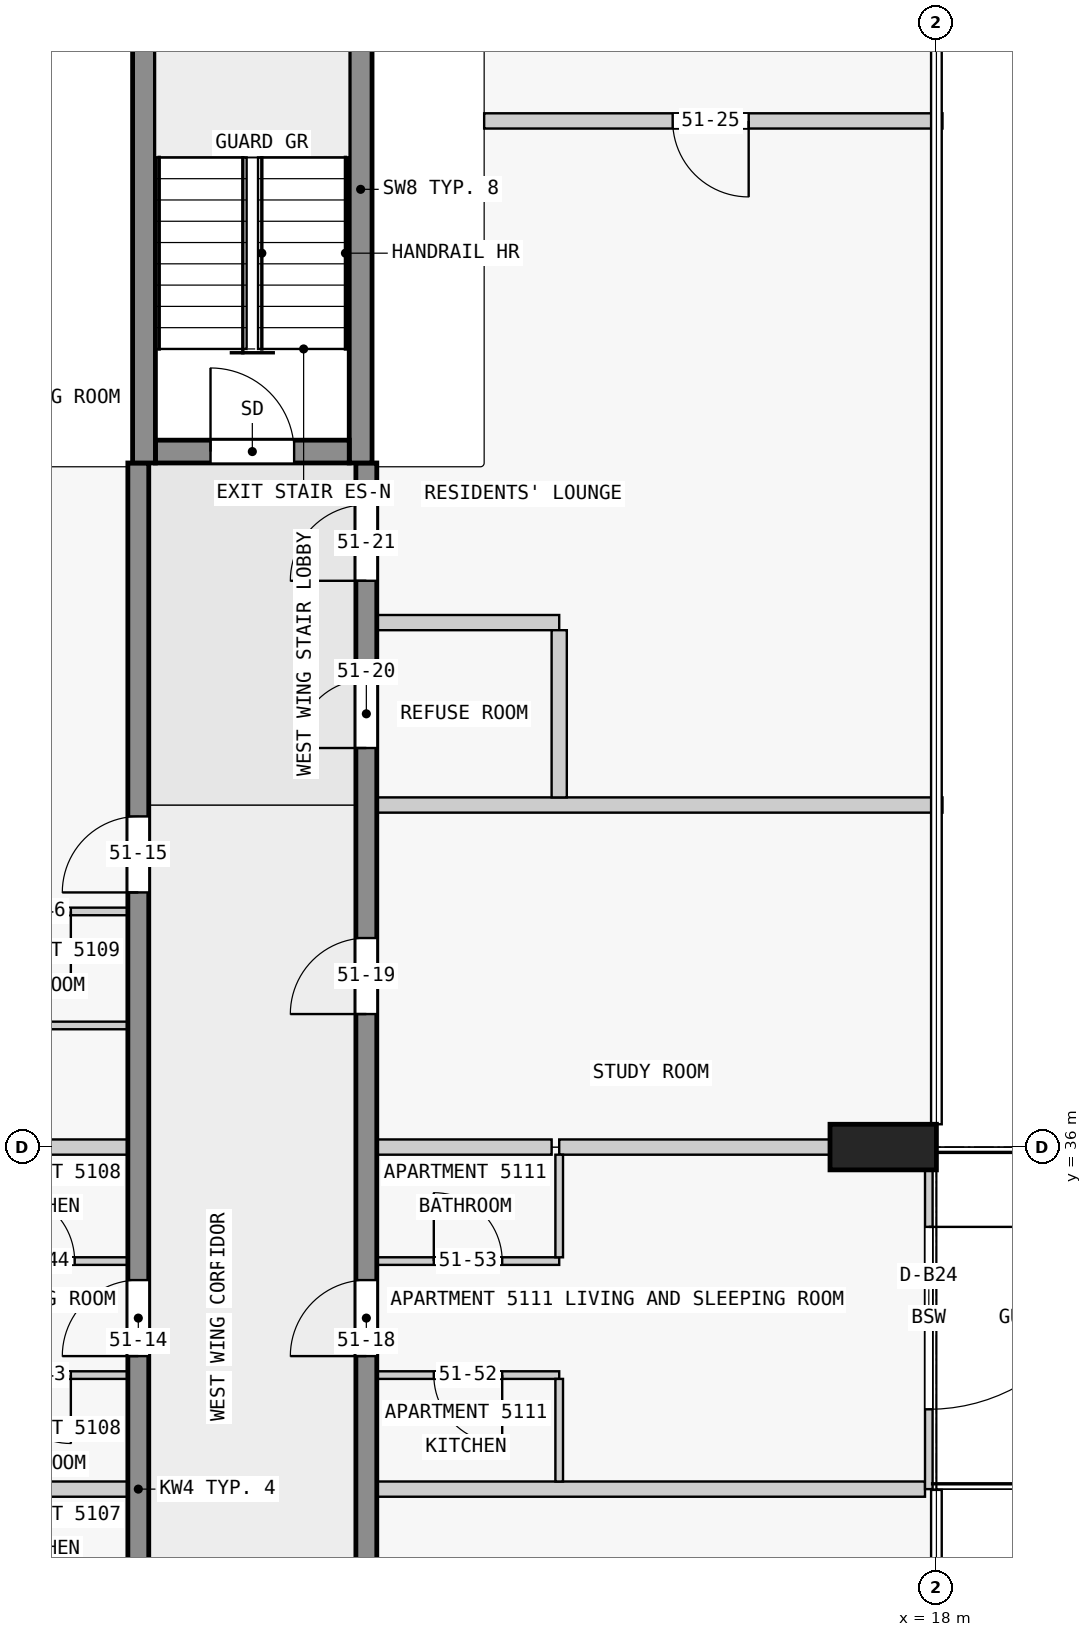
"""IFC4 building model, lengths in metres.
Left out: names, types, materials, properties, quantities, classifications, styles, units other than length and angle.
Written with IfcOpenShell. Run it as: python <this file> out.ifc"""

import sys

from ifc_helpers import new_model, si_unit, direction, frame, frame_2d, origin, origin_2d, place, context, subcontext, project, spatial, rectangle, extrude, element, fill, save


model = new_model("IFC4")
c1 = context("Model", 3, precision=1e-05, world=origin(), true_north=direction((0.0, 1.0)))
c2 = subcontext(c1, "Body", "Model", "MODEL_VIEW")
j1 = project(units=[si_unit("LENGTHUNIT", "METRE"), si_unit("PLANEANGLEUNIT", "RADIAN")], contexts=[c1])
p1 = place(None, origin())
s1 = spatial("IfcSite", under=j1, at=p1, CompositionType="ELEMENT")
p2 = place(p1, origin())
s2 = spatial("IfcBuilding", under=s1, at=p2, CompositionType="ELEMENT")
p3 = place(p2, frame((0.0, 0.0, 197.9)))
s3 = spatial("IfcBuildingStorey", under=s2, at=p3, CompositionType="ELEMENT", Elevation=197.9)
p4 = place(p3, frame((17.3, 36.0, 0.0), z_axis=(0.0, 0.0, 1.0), x_axis=(0.0, 1.0, 0.0)))
e1 = element("IfcColumn", 1, at=p4, inside=s3, PredefinedType="COLUMN", context=c2, shape_type="SweptSolid", body=[
    extrude(rectangle(XDim=0.6, YDim=1.4, at=origin_2d()), origin(), (0.0, 0.0, 1.0), 3.5),
])
p5 = place(p3, frame((7.725, 45.15, 0.0), z_axis=(0.0, 0.0, 1.0), x_axis=(1.0, 0.0, 0.0)))
e2 = element("IfcWall", 2, at=p5, inside=s3, PredefinedType="SHEAR", context=c2, shape_type="SweptSolid", body=[
    extrude(rectangle(XDim=2.55, YDim=0.3, at=frame_2d((1.275, 0.0))), origin(), (0.0, 0.0, 1.0), 3.5),
])
p6 = place(p5, frame((0.725, 0.0, 0.0)))
e3 = element("IfcOpeningElement", 3, at=p6, cuts=e2, PredefinedType="OPENING", context=c2, shape_type="SweptSolid", body=[
    extrude(rectangle(XDim=1.1, YDim=2.1, at=frame_2d((0.55, 1.05))), frame((0.0, 0.16, 0.0), z_axis=(0.0, -1.0, 0.0), x_axis=(1.0, 0.0, 0.0)), (0.0, 0.0, 1.0), 0.32),
])
for number, where, z_axis, x_axis in (
    (4, (7.575, 45.0, 0.0), (0.0, 0.0, 1.0), (0.0, 1.0, 0.0)),
    (5, (10.425, 45.0, 0.0), (0.0, 0.0, 1.0), (0.0, 1.0, 0.0)),
):
    element("IfcWall", number, at=place(p3, frame(where, z_axis=z_axis, x_axis=x_axis)), inside=s3, PredefinedType="SHEAR", context=c2, shape_type="SweptSolid", body=[
        extrude(rectangle(XDim=7.2, YDim=0.3, at=frame_2d((3.6, 0.0))), origin(), (0.0, 0.0, 1.0), 3.5),
    ])
p7 = place(p3, frame((7.5, 18.0, 0.0), z_axis=(0.0, 0.0, 1.0), x_axis=(0.0, 1.0, 0.0)))
e6 = element("IfcWall", 6, at=p7, inside=s3, PredefinedType="SHEAR", context=c2, shape_type="SweptSolid", body=[
    extrude(rectangle(XDim=27.0, YDim=0.275, at=frame_2d((13.5, 0.0))), origin(), (0.0, 0.0, 1.0), 3.25),
])
p8 = place(p7, frame((1.75, 0.0, 0.0)))
e7 = element("IfcOpeningElement", 7, at=p8, cuts=e6, PredefinedType="OPENING", context=c2, shape_type="SweptSolid", body=[
    extrude(rectangle(XDim=1.0, YDim=2.1, at=frame_2d((0.5, 1.05))), frame((0.0, 0.147, 0.0), z_axis=(0.0, -1.0, 0.0), x_axis=(1.0, 0.0, 0.0)), (0.0, 0.0, 1.0), 0.295),
])
p9 = place(p7, frame((5.85, 0.0, 0.0)))
e8 = element("IfcOpeningElement", 8, at=p9, cuts=e6, PredefinedType="OPENING", context=c2, shape_type="SweptSolid", body=[
    extrude(rectangle(XDim=1.8, YDim=2.1, at=frame_2d((0.9, 1.05))), frame((0.0, 0.147, 0.0), z_axis=(0.0, -1.0, 0.0), x_axis=(1.0, 0.0, 0.0)), (0.0, 0.0, 1.0), 0.295),
])
p10 = place(p7, frame((10.75, 0.0, 0.0)))
e9 = element("IfcOpeningElement", 9, at=p10, cuts=e6, PredefinedType="OPENING", context=c2, shape_type="SweptSolid", body=[
    extrude(rectangle(XDim=1.0, YDim=2.1, at=frame_2d((0.5, 1.05))), frame((0.0, 0.147, 0.0), z_axis=(0.0, -1.0, 0.0), x_axis=(1.0, 0.0, 0.0)), (0.0, 0.0, 1.0), 0.295),
])
p11 = place(p7, frame((15.25, 0.0, 0.0)))
e10 = element("IfcOpeningElement", 10, at=p11, cuts=e6, PredefinedType="OPENING", context=c2, shape_type="SweptSolid", body=[
    extrude(rectangle(XDim=1.0, YDim=2.1, at=frame_2d((0.5, 1.05))), frame((0.0, 0.147, 0.0), z_axis=(0.0, -1.0, 0.0), x_axis=(1.0, 0.0, 0.0)), (0.0, 0.0, 1.0), 0.295),
])
p12 = place(p7, frame((21.35, 0.0, 0.0)))
e11 = element("IfcOpeningElement", 11, at=p12, cuts=e6, PredefinedType="OPENING", context=c2, shape_type="SweptSolid", body=[
    extrude(rectangle(XDim=1.0, YDim=2.1, at=frame_2d((0.5, 1.05))), frame((0.0, 0.147, 0.0), z_axis=(0.0, -1.0, 0.0), x_axis=(1.0, 0.0, 0.0)), (0.0, 0.0, 1.0), 0.295),
])
p13 = place(p3, frame((10.5, 18.0, 0.0), z_axis=(0.0, 0.0, 1.0), x_axis=(0.0, 1.0, 0.0)))
e12 = element("IfcWall", 12, at=p13, inside=s3, PredefinedType="SHEAR", context=c2, shape_type="SweptSolid", body=[
    extrude(rectangle(XDim=27.0, YDim=0.275, at=frame_2d((13.5, 0.0))), origin(), (0.0, 0.0, 1.0), 3.25),
])
p14 = place(p13, frame((1.75, 0.0, 0.0)))
e13 = element("IfcOpeningElement", 13, at=p14, cuts=e12, PredefinedType="OPENING", context=c2, shape_type="SweptSolid", body=[
    extrude(rectangle(XDim=1.0, YDim=2.1, at=frame_2d((0.5, 1.05))), frame((0.0, 0.147, 0.0), z_axis=(0.0, -1.0, 0.0), x_axis=(1.0, 0.0, 0.0)), (0.0, 0.0, 1.0), 0.295),
])
p15 = place(p13, frame((6.25, 0.0, 0.0)))
e14 = element("IfcOpeningElement", 14, at=p15, cuts=e12, PredefinedType="OPENING", context=c2, shape_type="SweptSolid", body=[
    extrude(rectangle(XDim=1.0, YDim=2.1, at=frame_2d((0.5, 1.05))), frame((0.0, 0.147, 0.0), z_axis=(0.0, -1.0, 0.0), x_axis=(1.0, 0.0, 0.0)), (0.0, 0.0, 1.0), 0.295),
])
p16 = place(p13, frame((15.25, 0.0, 0.0)))
e15 = element("IfcOpeningElement", 15, at=p16, cuts=e12, PredefinedType="OPENING", context=c2, shape_type="SweptSolid", body=[
    extrude(rectangle(XDim=1.0, YDim=2.1, at=frame_2d((0.5, 1.05))), frame((0.0, 0.147, 0.0), z_axis=(0.0, -1.0, 0.0), x_axis=(1.0, 0.0, 0.0)), (0.0, 0.0, 1.0), 0.295),
])
p17 = place(p13, frame((19.75, 0.0, 0.0)))
e16 = element("IfcOpeningElement", 16, at=p17, cuts=e12, PredefinedType="OPENING", context=c2, shape_type="SweptSolid", body=[
    extrude(rectangle(XDim=1.0, YDim=2.1, at=frame_2d((0.5, 1.05))), frame((0.0, 0.147, 0.0), z_axis=(0.0, -1.0, 0.0), x_axis=(1.0, 0.0, 0.0)), (0.0, 0.0, 1.0), 0.295),
])
p18 = place(p13, frame((23.25, 0.0, 0.0)))
e17 = element("IfcOpeningElement", 17, at=p18, cuts=e12, PredefinedType="OPENING", context=c2, shape_type="SweptSolid", body=[
    extrude(rectangle(XDim=0.9, YDim=2.1, at=frame_2d((0.45, 1.05))), frame((0.0, 0.147, 0.0), z_axis=(0.0, -1.0, 0.0), x_axis=(1.0, 0.0, 0.0)), (0.0, 0.0, 1.0), 0.295),
])
p19 = place(p13, frame((25.45, 0.0, 0.0)))
e18 = element("IfcOpeningElement", 18, at=p19, cuts=e12, PredefinedType="OPENING", context=c2, shape_type="SweptSolid", body=[
    extrude(rectangle(XDim=1.0, YDim=2.1, at=frame_2d((0.5, 1.05))), frame((0.0, 0.147, 0.0), z_axis=(0.0, -1.0, 0.0), x_axis=(1.0, 0.0, 0.0)), (0.0, 0.0, 1.0), 0.295),
])
p20 = place(p3, frame((17.9, 36.0, 0.0), z_axis=(0.0, 0.0, 1.0), x_axis=(0.0, -1.0, 0.0)))
e19 = element("IfcWall", 19, at=p20, inside=s3, PredefinedType="STANDARD", context=c2, shape_type="SweptSolid", body=[
    extrude(rectangle(XDim=4.5, YDim=0.1, at=frame_2d((2.25, 0.0))), origin(), (0.0, 0.0, 1.0), 3.25),
])
p21 = place(p20, frame((1.05, 0.0, 0.0)))
e20 = element("IfcOpeningElement", 20, at=p21, cuts=e19, PredefinedType="OPENING", context=c2, shape_type="SweptSolid", body=[
    extrude(rectangle(XDim=2.4, YDim=2.4, at=frame_2d((1.2, 1.2))), frame((0.0, 0.06, 0.0), z_axis=(0.0, -1.0, 0.0), x_axis=(1.0, 0.0, 0.0)), (0.0, 0.0, 1.0), 0.12),
])
p22 = place(p3, frame((7.363, 31.5, 0.0), z_axis=(0.0, 0.0, 1.0), x_axis=(-1.0, 0.0, 0.0)))
e21 = element("IfcWall", 21, at=p22, inside=s3, PredefinedType="PARTITIONING", context=c2, shape_type="SweptSolid", body=[
    extrude(rectangle(XDim=2.3, YDim=0.2, at=frame_2d((1.15, 0.0))), origin(), (0.0, 0.0, 1.0), 3.25),
])
p23 = place(p3, frame((17.85, 31.5, 0.0), z_axis=(0.0, 0.0, 1.0), x_axis=(-1.0, 0.0, 0.0)))
e22 = element("IfcWall", 22, at=p23, inside=s3, PredefinedType="PARTITIONING", context=c2, shape_type="SweptSolid", body=[
    extrude(rectangle(XDim=7.213, YDim=0.2, at=frame_2d((3.606, 0.0))), origin(), (0.0, 0.0, 1.0), 3.25),
])
p24 = place(p3, frame((7.363, 33.0, 0.0), z_axis=(0.0, 0.0, 1.0), x_axis=(-1.0, 0.0, 0.0)))
e23 = element("IfcWall", 23, at=p24, inside=s3, PredefinedType="PARTITIONING", context=c2, shape_type="SweptSolid", body=[
    extrude(rectangle(XDim=2.35, YDim=0.1, at=frame_2d((1.175, 0.0))), origin(), (0.0, 0.0, 1.0), 3.25),
])
p25 = place(p24, frame((0.75, 0.0, 0.0)))
e24 = element("IfcOpeningElement", 24, at=p25, cuts=e23, PredefinedType="OPENING", context=c2, shape_type="SweptSolid", body=[
    extrude(rectangle(XDim=0.9, YDim=2.1, at=frame_2d((0.45, 1.05))), frame((0.0, 0.06, 0.0), z_axis=(0.0, -1.0, 0.0), x_axis=(1.0, 0.0, 0.0)), (0.0, 0.0, 1.0), 0.12),
])
p26 = place(p3, frame((13.038, 33.0, 0.0), z_axis=(0.0, 0.0, 1.0), x_axis=(-1.0, 0.0, 0.0)))
e25 = element("IfcWall", 25, at=p26, inside=s3, PredefinedType="PARTITIONING", context=c2, shape_type="SweptSolid", body=[
    extrude(rectangle(XDim=2.4, YDim=0.1, at=frame_2d((1.2, 0.0))), origin(), (0.0, 0.0, 1.0), 3.25),
])
p27 = place(p26, frame((0.75, 0.0, 0.0)))
e26 = element("IfcOpeningElement", 26, at=p27, cuts=e25, PredefinedType="OPENING", context=c2, shape_type="SweptSolid", body=[
    extrude(rectangle(XDim=0.9, YDim=2.1, at=frame_2d((0.45, 1.05))), frame((0.0, 0.06, 0.0), z_axis=(0.0, -1.0, 0.0), x_axis=(1.0, 0.0, 0.0)), (0.0, 0.0, 1.0), 0.12),
])
p28 = place(p3, frame((5.012, 34.5, 0.0), z_axis=(0.0, 0.0, 1.0), x_axis=(1.0, 0.0, 0.0)))
e27 = element("IfcWall", 27, at=p28, inside=s3, PredefinedType="PARTITIONING", context=c2, shape_type="SweptSolid", body=[
    extrude(rectangle(XDim=2.35, YDim=0.1, at=frame_2d((1.175, 0.0))), origin(), (0.0, 0.0, 1.0), 3.25),
])
p29 = place(p28, frame((0.75, 0.0, 0.0)))
e28 = element("IfcOpeningElement", 28, at=p29, cuts=e27, PredefinedType="OPENING", context=c2, shape_type="SweptSolid", body=[
    extrude(rectangle(XDim=0.9, YDim=2.1, at=frame_2d((0.45, 1.05))), frame((0.0, 0.06, 0.0), z_axis=(0.0, -1.0, 0.0), x_axis=(1.0, 0.0, 0.0)), (0.0, 0.0, 1.0), 0.12),
])
p30 = place(p3, frame((10.637, 34.5, 0.0), z_axis=(0.0, 0.0, 1.0), x_axis=(1.0, 0.0, 0.0)))
e29 = element("IfcWall", 29, at=p30, inside=s3, PredefinedType="PARTITIONING", context=c2, shape_type="SweptSolid", body=[
    extrude(rectangle(XDim=2.4, YDim=0.1, at=frame_2d((1.2, 0.0))), origin(), (0.0, 0.0, 1.0), 3.25),
])
p31 = place(p30, frame((0.75, 0.0, 0.0)))
e30 = element("IfcOpeningElement", 30, at=p31, cuts=e29, PredefinedType="OPENING", context=c2, shape_type="SweptSolid", body=[
    extrude(rectangle(XDim=0.9, YDim=2.1, at=frame_2d((0.45, 1.05))), frame((0.0, 0.06, 0.0), z_axis=(0.0, -1.0, 0.0), x_axis=(1.0, 0.0, 0.0)), (0.0, 0.0, 1.0), 0.12),
])
for number, where, z_axis, x_axis in (
    (31, (7.363, 36.0, 0.0), (0.0, 0.0, 1.0), (-1.0, 0.0, 0.0)),
    (32, (12.938, 36.0, 0.0), (0.0, 0.0, 1.0), (-1.0, 0.0, 0.0)),
):
    element("IfcWall", number, at=place(p3, frame(where, z_axis=z_axis, x_axis=x_axis)), inside=s3, PredefinedType="PARTITIONING", context=c2, shape_type="SweptSolid", body=[
        extrude(rectangle(XDim=2.3, YDim=0.2, at=frame_2d((1.15, 0.0))), origin(), (0.0, 0.0, 1.0), 3.25),
    ])
p32 = place(p3, frame((13.038, 36.0, 0.0), z_axis=(0.0, 0.0, 1.0), x_axis=(1.0, 0.0, 0.0)))
e33 = element("IfcWall", 33, at=p32, inside=s3, PredefinedType="PARTITIONING", context=c2, shape_type="SweptSolid", body=[
    extrude(rectangle(XDim=3.562, YDim=0.2, at=frame_2d((1.781, 0.0))), origin(), (0.0, 0.0, 1.0), 3.25),
])
p33 = place(p3, frame((7.363, 37.6, 0.0), z_axis=(0.0, 0.0, 1.0), x_axis=(-1.0, 0.0, 0.0)))
e34 = element("IfcWall", 34, at=p33, inside=s3, PredefinedType="PARTITIONING", context=c2, shape_type="SweptSolid", body=[
    extrude(rectangle(XDim=2.35, YDim=0.1, at=frame_2d((1.175, 0.0))), origin(), (0.0, 0.0, 1.0), 3.25),
])
p34 = place(p3, frame((7.363, 39.1, 0.0), z_axis=(0.0, 0.0, 1.0), x_axis=(-1.0, 0.0, 0.0)))
e35 = element("IfcWall", 35, at=p34, inside=s3, PredefinedType="PARTITIONING", context=c2, shape_type="SweptSolid", body=[
    extrude(rectangle(XDim=2.35, YDim=0.1, at=frame_2d((1.175, 0.0))), origin(), (0.0, 0.0, 1.0), 3.25),
])
p35 = place(p34, frame((0.75, 0.0, 0.0)))
e36 = element("IfcOpeningElement", 36, at=p35, cuts=e35, PredefinedType="OPENING", context=c2, shape_type="SweptSolid", body=[
    extrude(rectangle(XDim=0.9, YDim=2.1, at=frame_2d((0.45, 1.05))), frame((0.0, 0.06, 0.0), z_axis=(0.0, -1.0, 0.0), x_axis=(1.0, 0.0, 0.0)), (0.0, 0.0, 1.0), 0.12),
])
p36 = place(p3, frame((18.08, 40.5, 0.0), z_axis=(0.0, 0.0, 1.0), x_axis=(-1.0, 0.0, 0.0)))
e37 = element("IfcWall", 37, at=p36, inside=s3, PredefinedType="PARTITIONING", context=c2, shape_type="SweptSolid", body=[
    extrude(rectangle(XDim=7.443, YDim=0.2, at=frame_2d((3.721, 0.0))), origin(), (0.0, 0.0, 1.0), 3.25),
])
p37 = place(p3, frame((13.038, 42.9, 0.0), z_axis=(0.0, 0.0, 1.0), x_axis=(-1.0, 0.0, 0.0)))
e38 = element("IfcWall", 38, at=p37, inside=s3, PredefinedType="PARTITIONING", context=c2, shape_type="SweptSolid", body=[
    extrude(rectangle(XDim=2.4, YDim=0.2, at=frame_2d((1.2, 0.0))), origin(), (0.0, 0.0, 1.0), 3.25),
])
p38 = place(p3, frame((18.08, 49.5, 0.0), z_axis=(0.0, 0.0, 1.0), x_axis=(-1.0, 0.0, 0.0)))
e39 = element("IfcWall", 39, at=p38, inside=s3, PredefinedType="PARTITIONING", context=c2, shape_type="SweptSolid", body=[
    extrude(rectangle(XDim=6.03, YDim=0.2, at=frame_2d((3.015, 0.0))), origin(), (0.0, 0.0, 1.0), 3.25),
])
p39 = place(p38, frame((2.55, 0.0, 0.0)))
e40 = element("IfcOpeningElement", 40, at=p39, cuts=e39, PredefinedType="OPENING", context=c2, shape_type="SweptSolid", body=[
    extrude(rectangle(XDim=1.0, YDim=2.1, at=frame_2d((0.5, 1.05))), frame((0.0, 0.11, 0.0), z_axis=(0.0, -1.0, 0.0), x_axis=(1.0, 0.0, 0.0)), (0.0, 0.0, 1.0), 0.22),
])
for number, where, z_axis, x_axis in (
    (41, (13.038, 31.6, 0.0), (0.0, 0.0, 1.0), (0.0, 1.0, 0.0)),
    (42, (13.038, 34.55, 0.0), (0.0, 0.0, 1.0), (0.0, 1.0, 0.0)),
):
    element("IfcWall", number, at=place(p3, frame(where, z_axis=z_axis, x_axis=x_axis)), inside=s3, PredefinedType="PARTITIONING", context=c2, shape_type="SweptSolid", body=[
        extrude(rectangle(XDim=1.35, YDim=0.1, at=frame_2d((0.675, 0.0))), origin(), (0.0, 0.0, 1.0), 3.25),
    ])
p40 = place(p3, frame((13.038, 40.6, 0.0), z_axis=(0.0, 0.0, 1.0), x_axis=(0.0, 1.0, 0.0)))
e43 = element("IfcWall", 43, at=p40, inside=s3, PredefinedType="PARTITIONING", context=c2, shape_type="SweptSolid", body=[
    extrude(rectangle(XDim=2.2, YDim=0.2, at=frame_2d((1.1, 0.0))), origin(), (0.0, 0.0, 1.0), 3.25),
])
p41 = place(p21, origin())
e44 = element("IfcDoor", 44, at=p41, inside=s3, OperationType="SINGLE_SWING_LEFT", PredefinedType="DOOR", context=c2, shape_type="SweptSolid", body=[
    extrude(rectangle(XDim=2.4, YDim=2.4, at=frame_2d((1.2, 1.2))), frame((0.0, 0.025, 0.0), z_axis=(0.0, -1.0, 0.0), x_axis=(1.0, 0.0, 0.0)), (0.0, 0.0, 1.0), 0.05),
])
fill(e20, e44)
p42 = place(p6, origin())
e45 = element("IfcDoor", 45, at=p42, inside=s3, OperationType="SINGLE_SWING_LEFT", PredefinedType="DOOR", context=c2, shape_type="SweptSolid", body=[
    extrude(rectangle(XDim=1.1, YDim=2.1, at=frame_2d((0.55, 1.05))), frame((0.0, 0.025, 0.0), z_axis=(0.0, -1.0, 0.0), x_axis=(1.0, 0.0, 0.0)), (0.0, 0.0, 1.0), 0.05),
])
fill(e3, e45)
p43 = place(p11, origin())
e46 = element("IfcDoor", 46, at=p43, inside=s3, OperationType="SINGLE_SWING_RIGHT", PredefinedType="DOOR", context=c2, shape_type="SweptSolid", body=[
    extrude(rectangle(XDim=1.0, YDim=2.1, at=frame_2d((0.5, 1.05))), frame((0.0, 0.025, 0.0), z_axis=(0.0, -1.0, 0.0), x_axis=(1.0, 0.0, 0.0)), (0.0, 0.0, 1.0), 0.05),
])
fill(e10, e46)
p44 = place(p12, origin())
e47 = element("IfcDoor", 47, at=p44, inside=s3, OperationType="SINGLE_SWING_RIGHT", PredefinedType="DOOR", context=c2, shape_type="SweptSolid", body=[
    extrude(rectangle(XDim=1.0, YDim=2.1, at=frame_2d((0.5, 1.05))), frame((0.0, 0.025, 0.0), z_axis=(0.0, -1.0, 0.0), x_axis=(1.0, 0.0, 0.0)), (0.0, 0.0, 1.0), 0.05),
])
fill(e11, e47)
p45 = place(p16, origin())
e48 = element("IfcDoor", 48, at=p45, inside=s3, OperationType="SINGLE_SWING_RIGHT", PredefinedType="DOOR", context=c2, shape_type="SweptSolid", body=[
    extrude(rectangle(XDim=1.0, YDim=2.1, at=frame_2d((0.5, 1.05))), frame((0.0, 0.025, 0.0), z_axis=(0.0, -1.0, 0.0), x_axis=(1.0, 0.0, 0.0)), (0.0, 0.0, 1.0), 0.05),
])
fill(e15, e48)
p46 = place(p17, origin())
e49 = element("IfcDoor", 49, at=p46, inside=s3, OperationType="SINGLE_SWING_RIGHT", PredefinedType="DOOR", context=c2, shape_type="SweptSolid", body=[
    extrude(rectangle(XDim=1.0, YDim=2.1, at=frame_2d((0.5, 1.05))), frame((0.0, 0.025, 0.0), z_axis=(0.0, -1.0, 0.0), x_axis=(1.0, 0.0, 0.0)), (0.0, 0.0, 1.0), 0.05),
])
fill(e16, e49)
p47 = place(p18, origin())
e50 = element("IfcDoor", 50, at=p47, inside=s3, OperationType="SINGLE_SWING_RIGHT", PredefinedType="DOOR", context=c2, shape_type="SweptSolid", body=[
    extrude(rectangle(XDim=0.9, YDim=2.1, at=frame_2d((0.45, 1.05))), frame((0.0, 0.025, 0.0), z_axis=(0.0, -1.0, 0.0), x_axis=(1.0, 0.0, 0.0)), (0.0, 0.0, 1.0), 0.05),
])
fill(e17, e50)
p48 = place(p19, origin())
e51 = element("IfcDoor", 51, at=p48, inside=s3, OperationType="SINGLE_SWING_RIGHT", PredefinedType="DOOR", context=c2, shape_type="SweptSolid", body=[
    extrude(rectangle(XDim=1.0, YDim=2.1, at=frame_2d((0.5, 1.05))), frame((0.0, 0.025, 0.0), z_axis=(0.0, -1.0, 0.0), x_axis=(1.0, 0.0, 0.0)), (0.0, 0.0, 1.0), 0.05),
])
fill(e18, e51)
p49 = place(p39, origin())
e52 = element("IfcDoor", 52, at=p49, inside=s3, OperationType="SINGLE_SWING_RIGHT", PredefinedType="DOOR", context=c2, shape_type="SweptSolid", body=[
    extrude(rectangle(XDim=1.0, YDim=2.1, at=frame_2d((0.5, 1.05))), frame((0.0, 0.025, 0.0), z_axis=(0.0, -1.0, 0.0), x_axis=(1.0, 0.0, 0.0)), (0.0, 0.0, 1.0), 0.05),
])
fill(e40, e52)
p50 = place(p25, origin())
e53 = element("IfcDoor", 53, at=p50, inside=s3, OperationType="SINGLE_SWING_RIGHT", PredefinedType="DOOR", context=c2, shape_type="SweptSolid", body=[
    extrude(rectangle(XDim=0.9, YDim=2.1, at=frame_2d((0.45, 1.05))), frame((0.0, 0.025, 0.0), z_axis=(0.0, -1.0, 0.0), x_axis=(1.0, 0.0, 0.0)), (0.0, 0.0, 1.0), 0.05),
])
fill(e24, e53)
p51 = place(p29, origin())
e54 = element("IfcDoor", 54, at=p51, inside=s3, OperationType="SINGLE_SWING_RIGHT", PredefinedType="DOOR", context=c2, shape_type="SweptSolid", body=[
    extrude(rectangle(XDim=0.9, YDim=2.1, at=frame_2d((0.45, 1.05))), frame((0.0, 0.025, 0.0), z_axis=(0.0, -1.0, 0.0), x_axis=(1.0, 0.0, 0.0)), (0.0, 0.0, 1.0), 0.05),
])
fill(e28, e54)
p52 = place(p35, origin())
e55 = element("IfcDoor", 55, at=p52, inside=s3, OperationType="SINGLE_SWING_RIGHT", PredefinedType="DOOR", context=c2, shape_type="SweptSolid", body=[
    extrude(rectangle(XDim=0.9, YDim=2.1, at=frame_2d((0.45, 1.05))), frame((0.0, 0.025, 0.0), z_axis=(0.0, -1.0, 0.0), x_axis=(1.0, 0.0, 0.0)), (0.0, 0.0, 1.0), 0.05),
])
fill(e36, e55)
p53 = place(p27, origin())
e56 = element("IfcDoor", 56, at=p53, inside=s3, OperationType="SINGLE_SWING_LEFT", PredefinedType="DOOR", context=c2, shape_type="SweptSolid", body=[
    extrude(rectangle(XDim=0.9, YDim=2.1, at=frame_2d((0.45, 1.05))), frame((0.0, 0.025, 0.0), z_axis=(0.0, -1.0, 0.0), x_axis=(1.0, 0.0, 0.0)), (0.0, 0.0, 1.0), 0.05),
])
fill(e26, e56)
p54 = place(p31, origin())
e57 = element("IfcDoor", 57, at=p54, inside=s3, OperationType="SINGLE_SWING_LEFT", PredefinedType="DOOR", context=c2, shape_type="SweptSolid", body=[
    extrude(rectangle(XDim=0.9, YDim=2.1, at=frame_2d((0.45, 1.05))), frame((0.0, 0.025, 0.0), z_axis=(0.0, -1.0, 0.0), x_axis=(1.0, 0.0, 0.0)), (0.0, 0.0, 1.0), 0.05),
])
fill(e30, e57)
save(model, sys.argv[1])
